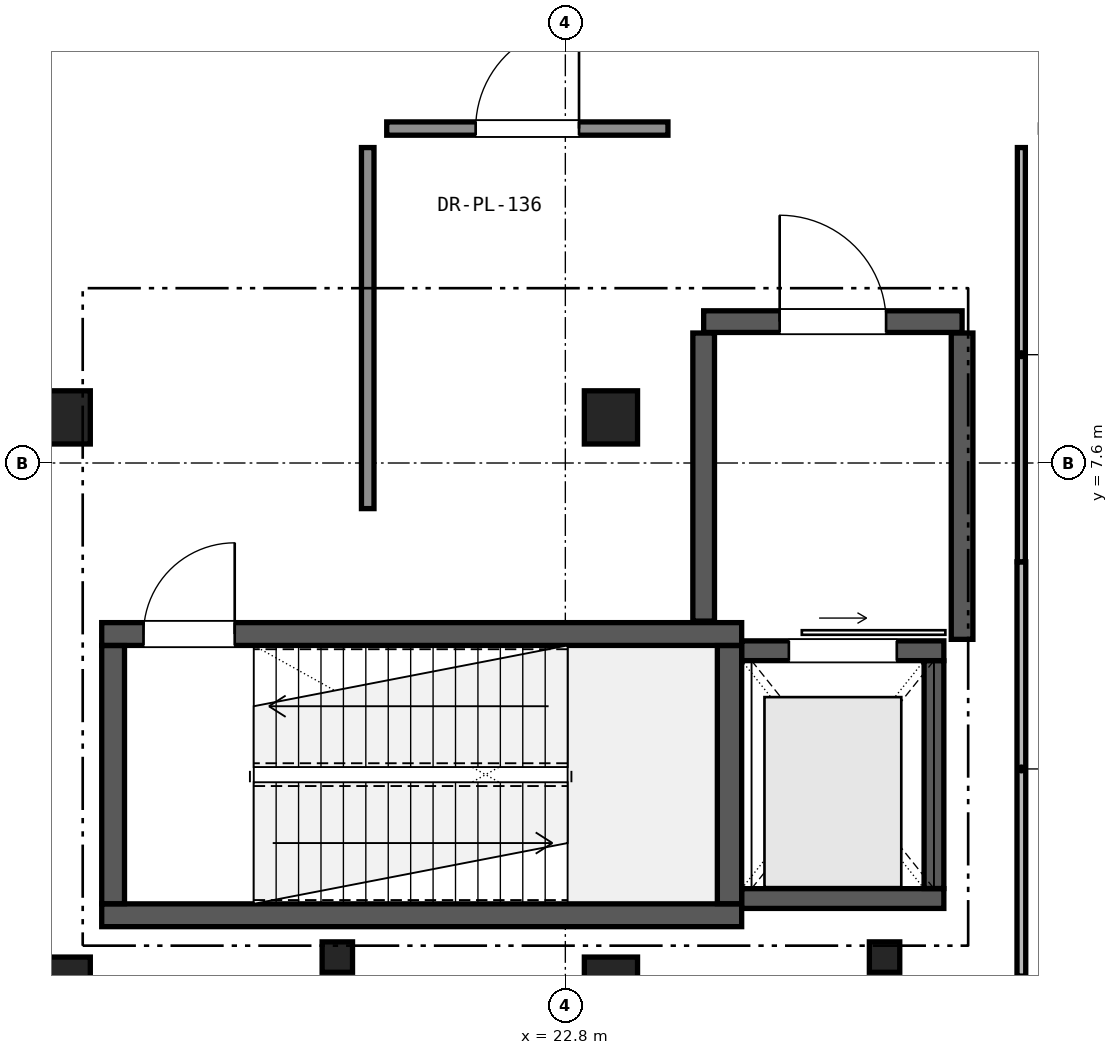
"""IFC4 building model, lengths in metres.
Left out: names, types, materials, properties, quantities, classifications, styles, units other than length and angle.
Written with IfcOpenShell. Run it as: python <this file> out.ifc"""

import sys

from ifc_helpers import new_model, si_unit, direction, frame, frame_2d, origin, origin_2d, place, context, subcontext, project, spatial, rectangle, extrude, element, fill, save


model = new_model("IFC4")
c1 = context("Model", 3, precision=1e-05, world=origin(), true_north=direction((0.0, 1.0)))
c2 = subcontext(c1, "Body", "Model", "MODEL_VIEW")
j1 = project(units=[si_unit("LENGTHUNIT", "METRE"), si_unit("PLANEANGLEUNIT", "RADIAN")], contexts=[c1])
p1 = place(None, origin())
s1 = spatial("IfcSite", under=j1, at=p1, CompositionType="ELEMENT")
p2 = place(p1, origin())
s2 = spatial("IfcBuilding", under=s1, at=p2, CompositionType="ELEMENT")
p3 = place(p2, origin())
s3 = spatial("IfcBuildingStorey", under=s2, at=p3, CompositionType="ELEMENT", Elevation=0.0)
for number, where, z_axis, x_axis in (
    (1, (16.2, 0.75, 0.0), (0.0, 0.0, 1.0), (1.0, 0.0, 0.0)),
    (2, (16.2, 8.2, 0.0), (0.0, 0.0, 1.0), (1.0, 0.0, 0.0)),
    (3, (23.4, 0.75, 0.0), (0.0, 0.0, 1.0), (1.0, 0.0, 0.0)),
    (4, (23.4, 8.2, 0.0), (0.0, 0.0, 1.0), (1.0, 0.0, 0.0)),
):
    element("IfcColumn", number, at=place(p3, frame(where, z_axis=z_axis, x_axis=x_axis)), inside=s3, PredefinedType="COLUMN", context=c2, shape_type="SweptSolid", body=[
        extrude(rectangle(XDim=0.7, YDim=0.7, at=origin_2d()), origin(), (0.0, 0.0, 1.0), 5.1),
    ])
for number, where, z_axis, x_axis in (
    (5, (19.8, 1.1, 0.0), (0.0, 0.0, 1.0), (1.0, 0.0, 0.0)),
    (6, (27.0, 1.1, 0.0), (0.0, 0.0, 1.0), (1.0, 0.0, 0.0)),
):
    element("IfcColumn", number, at=place(p3, frame(where, z_axis=z_axis, x_axis=x_axis)), inside=s3, PredefinedType="PILASTER", context=c2, shape_type="SweptSolid", body=[
        extrude(rectangle(XDim=0.4, YDim=0.4, at=origin_2d()), origin(), (0.0, 0.0, 1.0), 5.1),
    ])
p4 = place(p3, frame((16.7, 1.65, 0.0), z_axis=(0.0, 0.0, 1.0), x_axis=(1.0, 0.0, 0.0)))
e7 = element("IfcWall", 7, at=p4, inside=s3, PredefinedType="SHEAR", context=c2, shape_type="SweptSolid", body=[
    extrude(rectangle(XDim=8.42, YDim=0.3, at=frame_2d((4.21, 0.0))), origin(), (0.0, 0.0, 1.0), 4.785),
])
p5 = place(p3, frame((16.7, 5.35, 0.0), z_axis=(0.0, 0.0, 1.0), x_axis=(1.0, 0.0, 0.0)))
e8 = element("IfcWall", 8, at=p5, inside=s3, PredefinedType="SHEAR", context=c2, shape_type="SweptSolid", body=[
    extrude(rectangle(XDim=8.42, YDim=0.3, at=frame_2d((4.21, 0.0))), origin(), (0.0, 0.0, 1.0), 4.785),
])
p6 = place(p5, frame((0.55, 0.0, 0.0)))
e9 = element("IfcOpeningElement", 9, at=p6, cuts=e8, PredefinedType="OPENING", context=c2, shape_type="SweptSolid", body=[
    extrude(rectangle(XDim=1.2, YDim=2.2, at=frame_2d((0.6, 1.1))), frame((0.0, 0.16, 0.0), z_axis=(0.0, -1.0, 0.0), x_axis=(1.0, 0.0, 0.0)), (0.0, 0.0, 1.0), 0.32),
])
p7 = place(p3, frame((16.85, 1.802, 0.0), z_axis=(0.0, 0.0, 1.0), x_axis=(0.0, 1.0, 0.0)))
e10 = element("IfcWall", 10, at=p7, inside=s3, PredefinedType="SHEAR", context=c2, shape_type="SweptSolid", body=[
    extrude(rectangle(XDim=3.396, YDim=0.3, at=frame_2d((1.698, 0.0))), origin(), (0.0, 0.0, 1.0), 4.785),
])
p8 = place(p3, frame((24.96, 1.802, 0.0), z_axis=(0.0, 0.0, 1.0), x_axis=(0.0, 1.0, 0.0)))
e11 = element("IfcWall", 11, at=p8, inside=s3, PredefinedType="SHEAR", context=c2, shape_type="SweptSolid", body=[
    extrude(rectangle(XDim=3.396, YDim=0.32, at=frame_2d((1.698, 0.0))), origin(), (0.0, 0.0, 1.0), 4.785),
])
p9 = place(p3, frame((25.122, 1.87, 0.0), z_axis=(0.0, 0.0, 1.0), x_axis=(1.0, 0.0, 0.0)))
e12 = element("IfcWall", 12, at=p9, inside=s3, PredefinedType="SHEAR", context=c2, shape_type="SweptSolid", body=[
    extrude(rectangle(XDim=2.658, YDim=0.26, at=frame_2d((1.329, 0.0))), origin(), (0.0, 0.0, 1.0), 4.785),
])
p10 = place(p3, frame((25.122, 5.13, 0.0), z_axis=(0.0, 0.0, 1.0), x_axis=(1.0, 0.0, 0.0)))
e13 = element("IfcWall", 13, at=p10, inside=s3, PredefinedType="SHEAR", context=c2, shape_type="SweptSolid", body=[
    extrude(rectangle(XDim=2.658, YDim=0.26, at=frame_2d((1.329, 0.0))), origin(), (0.0, 0.0, 1.0), 4.785),
])
p11 = place(p10, frame((0.619, 0.0, 0.0)))
e14 = element("IfcOpeningElement", 14, at=p11, cuts=e13, PredefinedType="OPENING", context=c2, shape_type="SweptSolid", body=[
    extrude(rectangle(XDim=1.42, YDim=2.25, at=frame_2d((0.71, 1.125))), frame((0.0, 0.14, 0.0), z_axis=(0.0, -1.0, 0.0), x_axis=(1.0, 0.0, 0.0)), (0.0, 0.0, 1.0), 0.28),
])
p12 = place(p3, frame((27.65, 2.002, 0.0), z_axis=(0.0, 0.0, 1.0), x_axis=(0.0, 1.0, 0.0)))
e15 = element("IfcWall", 15, at=p12, inside=s3, PredefinedType="SHEAR", context=c2, shape_type="SweptSolid", body=[
    extrude(rectangle(XDim=2.996, YDim=0.26, at=frame_2d((1.498, 0.0))), origin(), (0.0, 0.0, 1.0), 4.785),
])
p13 = place(p3, frame((24.62, 9.46, 0.0), z_axis=(0.0, 0.0, 1.0), x_axis=(1.0, 0.0, 0.0)))
e16 = element("IfcWall", 16, at=p13, inside=s3, PredefinedType="SHEAR", context=c2, shape_type="SweptSolid", body=[
    extrude(rectangle(XDim=3.4, YDim=0.285, at=frame_2d((1.7, 0.0))), origin(), (0.0, 0.0, 1.0), 4.785),
])
p14 = place(p13, frame((1.0, 0.0, 0.0)))
e17 = element("IfcOpeningElement", 17, at=p14, cuts=e16, PredefinedType="OPENING", context=c2, shape_type="SweptSolid", body=[
    extrude(rectangle(XDim=1.4, YDim=2.25, at=frame_2d((0.7, 1.125))), frame((0.0, 0.152, 0.0), z_axis=(0.0, -1.0, 0.0), x_axis=(1.0, 0.0, 0.0)), (0.0, 0.0, 1.0), 0.305),
])
p15 = place(p3, frame((24.62, 5.52, 0.0), z_axis=(0.0, 0.0, 1.0), x_axis=(0.0, 1.0, 0.0)))
e18 = element("IfcWall", 18, at=p15, inside=s3, PredefinedType="SHEAR", context=c2, shape_type="SweptSolid", body=[
    extrude(rectangle(XDim=3.79, YDim=0.285, at=frame_2d((1.895, 0.0))), origin(), (0.0, 0.0, 1.0), 4.035),
])
p16 = place(p3, frame((28.02, 5.28, 0.0), z_axis=(0.0, 0.0, 1.0), x_axis=(0.0, 1.0, 0.0)))
e19 = element("IfcWall", 19, at=p16, inside=s3, PredefinedType="SHEAR", context=c2, shape_type="SweptSolid", body=[
    extrude(rectangle(XDim=4.03, YDim=0.285, at=frame_2d((2.015, 0.0))), origin(), (0.0, 0.0, 1.0), 4.035),
])
p17 = place(p3, frame((20.45, 12.0, 0.0), z_axis=(0.0, 0.0, 1.0), x_axis=(1.0, 0.0, 0.0)))
e20 = element("IfcWall", 20, at=p17, inside=s3, PredefinedType="PARTITIONING", context=c2, shape_type="SweptSolid", body=[
    extrude(rectangle(XDim=3.7, YDim=0.175, at=frame_2d((1.85, 0.0))), origin(), (0.0, 0.0, 1.0), 4.185),
])
p18 = place(p17, frame((1.17, 0.0, 0.0)))
e21 = element("IfcOpeningElement", 21, at=p18, cuts=e20, PredefinedType="OPENING", context=c2, shape_type="SweptSolid", body=[
    extrude(rectangle(XDim=1.36, YDim=2.25, at=frame_2d((0.68, 1.125))), frame((0.0, 0.097, 0.0), z_axis=(0.0, -1.0, 0.0), x_axis=(1.0, 0.0, 0.0)), (0.0, 0.0, 1.0), 0.195),
])
p19 = place(p3, frame((20.2, 7.0, 0.0), z_axis=(0.0, 0.0, 1.0), x_axis=(0.0, 1.0, 0.0)))
e22 = element("IfcWall", 22, at=p19, inside=s3, PredefinedType="PARTITIONING", context=c2, shape_type="SweptSolid", body=[
    extrude(rectangle(XDim=4.75, YDim=0.165, at=frame_2d((2.375, 0.0))), origin(), (0.0, 0.0, 1.0), 4.085),
])
p20 = place(p3, frame((28.8, 0.85, 0.0), z_axis=(0.0, 0.0, 1.0), x_axis=(0.0, 1.0, 0.0)))
e23 = element("IfcWall", 23, at=p20, inside=s3, PredefinedType="PARTITIONING", context=c2, shape_type="SweptSolid", body=[
    extrude(rectangle(XDim=5.45, YDim=0.115, at=frame_2d((2.725, 0.0))), origin(), (0.0, 0.0, 1.0), 3.0),
])
p21 = place(p3, frame((28.8, 6.3, 0.0), z_axis=(0.0, 0.0, 1.0), x_axis=(0.0, 1.0, 0.0)))
e24 = element("IfcWall", 24, at=p21, inside=s3, PredefinedType="PARTITIONING", context=c2, shape_type="SweptSolid", body=[
    extrude(rectangle(XDim=5.45, YDim=0.105, at=frame_2d((2.725, 0.0))), origin(), (0.0, 0.0, 1.0), 4.035),
])
p22 = place(p6, origin())
e25 = element("IfcDoor", 25, at=p22, inside=s3, OperationType="SINGLE_SWING_RIGHT", PredefinedType="DOOR", context=c2, shape_type="SweptSolid", body=[
    extrude(rectangle(XDim=1.2, YDim=2.2, at=frame_2d((0.6, 1.1))), frame((0.0, 0.025, 0.0), z_axis=(0.0, -1.0, 0.0), x_axis=(1.0, 0.0, 0.0)), (0.0, 0.0, 1.0), 0.05),
])
fill(e9, e25)
p23 = place(p11, origin())
e26 = element("IfcDoor", 26, at=p23, inside=s3, OperationType="SLIDING_TO_RIGHT", PredefinedType="DOOR", context=c2, shape_type="SweptSolid", body=[
    extrude(rectangle(XDim=1.42, YDim=2.25, at=frame_2d((0.71, 1.125))), frame((0.0, 0.025, 0.0), z_axis=(0.0, -1.0, 0.0), x_axis=(1.0, 0.0, 0.0)), (0.0, 0.0, 1.0), 0.05),
])
fill(e14, e26)
p24 = place(p14, origin())
e27 = element("IfcDoor", 27, at=p24, inside=s3, OperationType="SINGLE_SWING_LEFT", PredefinedType="DOOR", context=c2, shape_type="SweptSolid", body=[
    extrude(rectangle(XDim=1.4, YDim=2.25, at=frame_2d((0.7, 1.125))), frame((0.0, 0.025, 0.0), z_axis=(0.0, -1.0, 0.0), x_axis=(1.0, 0.0, 0.0)), (0.0, 0.0, 1.0), 0.05),
])
fill(e17, e27)
p25 = place(p18, origin())
e28 = element("IfcDoor", 28, at=p25, inside=s3, OperationType="SINGLE_SWING_RIGHT", PredefinedType="DOOR", context=c2, shape_type="SweptSolid", body=[
    extrude(rectangle(XDim=1.36, YDim=2.25, at=frame_2d((0.68, 1.125))), frame((0.0, 0.025, 0.0), z_axis=(0.0, -1.0, 0.0), x_axis=(1.0, 0.0, 0.0)), (0.0, 0.0, 1.0), 0.05),
])
fill(e21, e28)
save(model, sys.argv[1])
